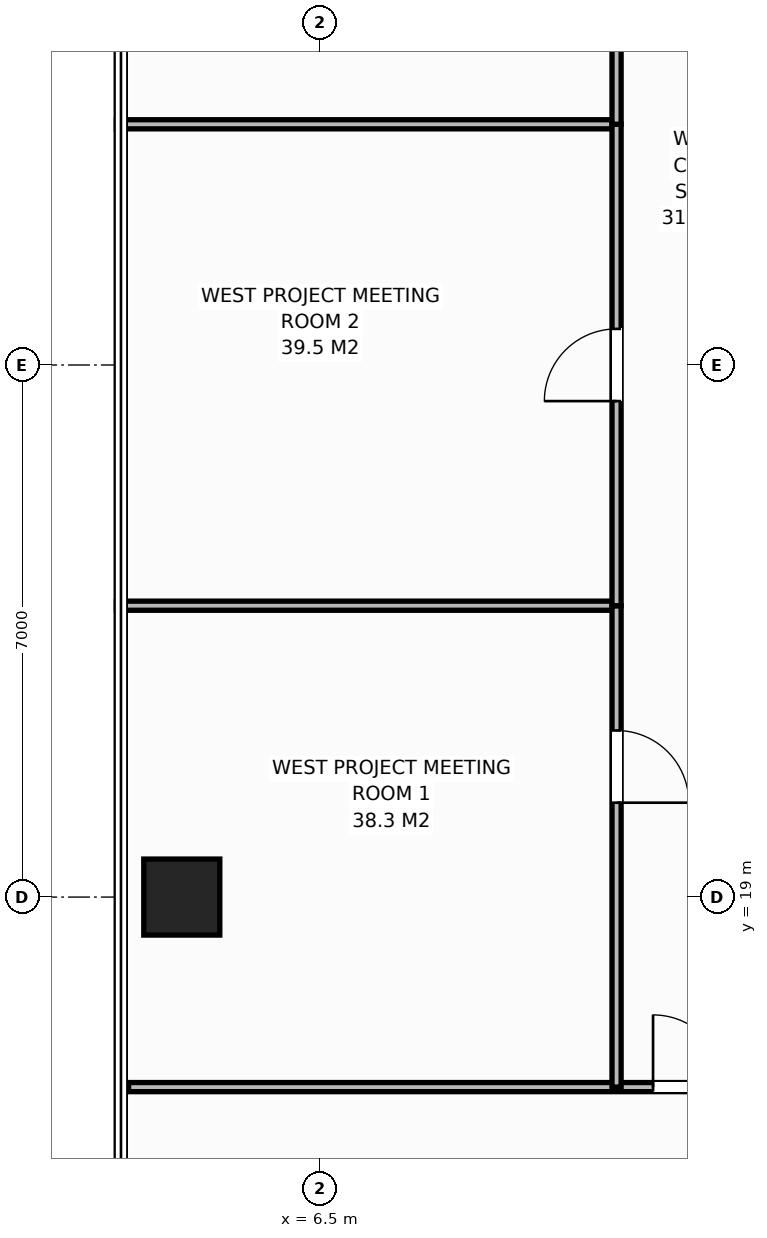
"""IFC4 building model, lengths in metres.
Left out: names, types, materials, properties, quantities, classifications, styles, units other than length and angle.
Written with IfcOpenShell. Run it as: python <this file> out.ifc"""

import sys

from ifc_helpers import new_model, si_unit, direction, frame, frame_2d, origin, origin_2d, place, context, subcontext, project, spatial, rectangle, extrude, element, fill, save


model = new_model("IFC4")
c1 = context("Model", 3, precision=1e-05, world=origin(), true_north=direction((0.0, 1.0)))
c2 = subcontext(c1, "Body", "Model", "MODEL_VIEW")
j1 = project(units=[si_unit("LENGTHUNIT", "METRE"), si_unit("PLANEANGLEUNIT", "RADIAN")], contexts=[c1])
p1 = place(None, origin())
s1 = spatial("IfcSite", under=j1, at=p1, CompositionType="ELEMENT")
p2 = place(p1, origin())
s2 = spatial("IfcBuilding", under=s1, at=p2, CompositionType="ELEMENT")
p3 = place(p2, frame((0.0, 0.0, 189.8)))
s3 = spatial("IfcBuildingStorey", under=s2, at=p3, CompositionType="ELEMENT", Elevation=189.8)
p4 = place(p3, frame((4.68, 19.0, 0.0), z_axis=(0.0, 0.0, 1.0), x_axis=(1.0, 0.0, 0.0)))
e1 = element("IfcColumn", 1, at=p4, inside=s3, PredefinedType="COLUMN", context=c2, shape_type="SweptSolid", body=[
    extrude(rectangle(XDim=1.0, YDim=1.0, at=origin_2d()), origin(), (0.0, 0.0, 1.0), 3.8),
])
p5 = place(p3, frame((3.98, 16.5, 0.0), z_axis=(0.0, 0.0, 1.0), x_axis=(1.0, 0.0, 0.0)))
e2 = element("IfcWall", 2, at=p5, inside=s3, PredefinedType="PARTITIONING", context=c2, shape_type="SweptSolid", body=[
    extrude(rectangle(XDim=10.537, YDim=0.12, at=frame_2d((5.269, 0.0))), origin(), (0.0, 0.0, 1.0), 3.572),
])
p6 = place(p5, frame((6.9, 0.0, 0.0)))
e3 = element("IfcOpeningElement", 3, at=p6, cuts=e2, PredefinedType="OPENING", context=c2, shape_type="SweptSolid", body=[
    extrude(rectangle(XDim=0.95, YDim=2.15, at=frame_2d((0.475, 1.075))), frame((0.0, 0.07, 0.0), z_axis=(0.0, -1.0, 0.0), x_axis=(1.0, 0.0, 0.0)), (0.0, 0.0, 1.0), 0.14),
])
p7 = place(p3, frame((3.82, 22.833, 0.0), z_axis=(0.0, 0.0, 1.0), x_axis=(1.0, 0.0, 0.0)))
e4 = element("IfcWall", 4, at=p7, inside=s3, PredefinedType="PARTITIONING", context=c2, shape_type="SweptSolid", body=[
    extrude(rectangle(XDim=6.58, YDim=0.12, at=frame_2d((3.29, 0.0))), origin(), (0.0, 0.0, 1.0), 3.572),
])
p8 = place(p3, frame((10.4, 16.5, 0.0), z_axis=(0.0, 0.0, 1.0), x_axis=(0.0, 1.0, 0.0)))
e5 = element("IfcWall", 5, at=p8, inside=s3, PredefinedType="PARTITIONING", context=c2, shape_type="SweptSolid", body=[
    extrude(rectangle(XDim=6.333, YDim=0.12, at=frame_2d((3.167, 0.0))), origin(), (0.0, 0.0, 1.0), 3.572),
])
p9 = place(p8, frame((3.742, 0.0, 0.0)))
e6 = element("IfcOpeningElement", 6, at=p9, cuts=e5, PredefinedType="OPENING", context=c2, shape_type="SweptSolid", body=[
    extrude(rectangle(XDim=0.95, YDim=2.15, at=frame_2d((0.475, 1.075))), frame((0.0, 0.07, 0.0), z_axis=(0.0, -1.0, 0.0), x_axis=(1.0, 0.0, 0.0)), (0.0, 0.0, 1.0), 0.14),
])
p10 = place(p3, frame((3.82, 29.167, 0.0), z_axis=(0.0, 0.0, 1.0), x_axis=(1.0, 0.0, 0.0)))
e7 = element("IfcWall", 7, at=p10, inside=s3, PredefinedType="PARTITIONING", context=c2, shape_type="SweptSolid", body=[
    extrude(rectangle(XDim=6.58, YDim=0.12, at=frame_2d((3.29, 0.0))), origin(), (0.0, 0.0, 1.0), 3.572),
])
p11 = place(p3, frame((10.4, 22.833, 0.0), z_axis=(0.0, 0.0, 1.0), x_axis=(0.0, 1.0, 0.0)))
e8 = element("IfcWall", 8, at=p11, inside=s3, PredefinedType="PARTITIONING", context=c2, shape_type="SweptSolid", body=[
    extrude(rectangle(XDim=6.333, YDim=0.12, at=frame_2d((3.167, 0.0))), origin(), (0.0, 0.0, 1.0), 3.572),
])
p12 = place(p11, frame((2.692, 0.0, 0.0)))
e9 = element("IfcOpeningElement", 9, at=p12, cuts=e8, PredefinedType="OPENING", context=c2, shape_type="SweptSolid", body=[
    extrude(rectangle(XDim=0.95, YDim=2.15, at=frame_2d((0.475, 1.075))), frame((0.0, 0.07, 0.0), z_axis=(0.0, -1.0, 0.0), x_axis=(1.0, 0.0, 0.0)), (0.0, 0.0, 1.0), 0.14),
])
p13 = place(p3, frame((10.4, 29.167, 0.0), z_axis=(0.0, 0.0, 1.0), x_axis=(0.0, 1.0, 0.0)))
e10 = element("IfcWall", 10, at=p13, inside=s3, PredefinedType="PARTITIONING", context=c2, shape_type="SweptSolid", body=[
    extrude(rectangle(XDim=6.333, YDim=0.12, at=frame_2d((3.167, 0.0))), origin(), (0.0, 0.0, 1.0), 3.572),
])
p14 = place(p13, frame((1.642, 0.0, 0.0)))
e11 = element("IfcOpeningElement", 11, at=p14, cuts=e10, PredefinedType="OPENING", context=c2, shape_type="SweptSolid", body=[
    extrude(rectangle(XDim=0.95, YDim=2.15, at=frame_2d((0.475, 1.075))), frame((0.0, 0.07, 0.0), z_axis=(0.0, -1.0, 0.0), x_axis=(1.0, 0.0, 0.0)), (0.0, 0.0, 1.0), 0.14),
])
p15 = place(p6, origin())
e12 = element("IfcDoor", 12, at=p15, inside=s3, OperationType="SINGLE_SWING_LEFT", PredefinedType="DOOR", context=c2, shape_type="SweptSolid", body=[
    extrude(rectangle(XDim=0.95, YDim=2.15, at=frame_2d((0.475, 1.075))), frame((0.0, 0.025, 0.0), z_axis=(0.0, -1.0, 0.0), x_axis=(1.0, 0.0, 0.0)), (0.0, 0.0, 1.0), 0.05),
])
fill(e3, e12)
p16 = place(p9, origin())
e13 = element("IfcDoor", 13, at=p16, inside=s3, OperationType="SINGLE_SWING_RIGHT", PredefinedType="DOOR", context=c2, shape_type="SweptSolid", body=[
    extrude(rectangle(XDim=0.95, YDim=2.15, at=frame_2d((0.475, 1.075))), frame((0.0, 0.025, 0.0), z_axis=(0.0, -1.0, 0.0), x_axis=(1.0, 0.0, 0.0)), (0.0, 0.0, 1.0), 0.05),
])
fill(e6, e13)
p17 = place(p12, origin())
e14 = element("IfcDoor", 14, at=p17, inside=s3, OperationType="SINGLE_SWING_LEFT", PredefinedType="DOOR", context=c2, shape_type="SweptSolid", body=[
    extrude(rectangle(XDim=0.95, YDim=2.15, at=frame_2d((0.475, 1.075))), frame((0.0, 0.025, 0.0), z_axis=(0.0, -1.0, 0.0), x_axis=(1.0, 0.0, 0.0)), (0.0, 0.0, 1.0), 0.05),
])
fill(e9, e14)
save(model, sys.argv[1])
